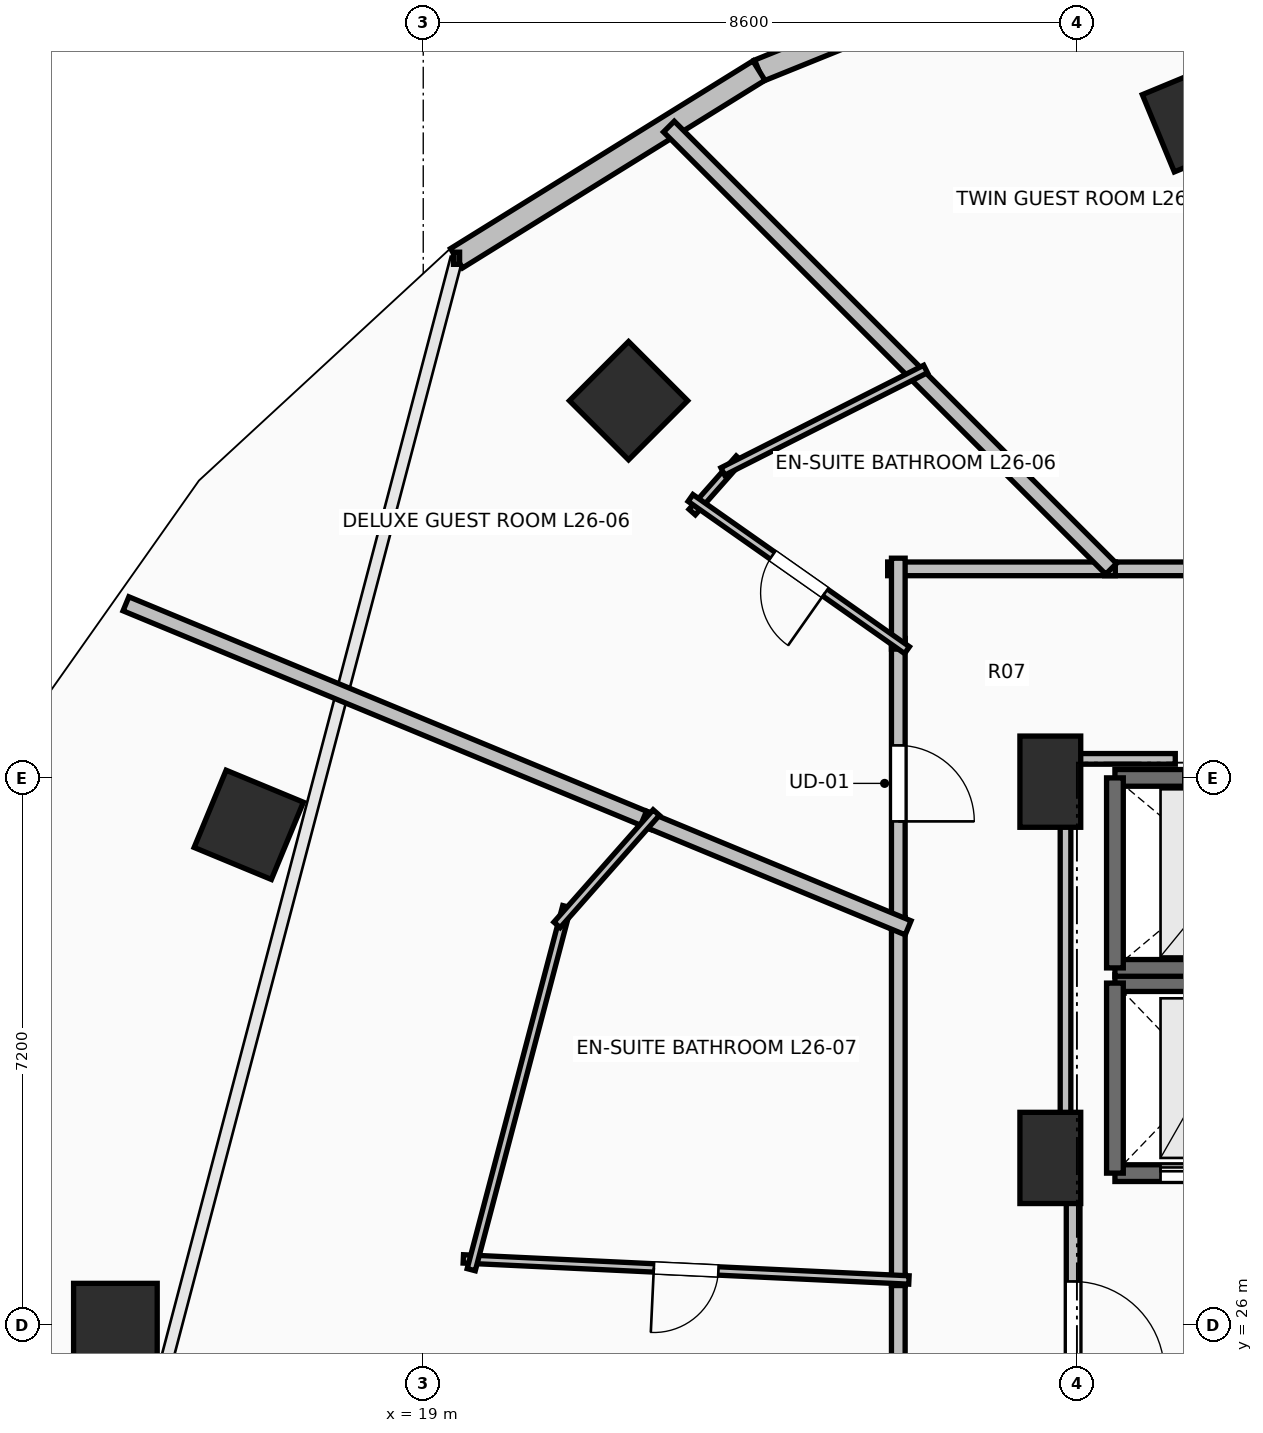
"""IFC4 building model, lengths in metres.
Left out: names, types, materials, properties, quantities, classifications, styles, units other than length and angle.
Written with IfcOpenShell. Run it as: python <this file> out.ifc"""

import sys

from ifc_helpers import new_model, si_unit, direction, frame, frame_2d, origin, origin_2d, place, context, subcontext, project, spatial, rectangle, extrude, element, fill, save


model = new_model("IFC4")
c1 = context("Model", 3, precision=1e-05, world=origin(), true_north=direction((0.0, 1.0)))
c2 = subcontext(c1, "Body", "Model", "MODEL_VIEW")
j1 = project(units=[si_unit("LENGTHUNIT", "METRE"), si_unit("PLANEANGLEUNIT", "RADIAN")], contexts=[c1])
p1 = place(None, origin())
s1 = spatial("IfcSite", under=j1, at=p1, CompositionType="ELEMENT")
p2 = place(p1, origin())
s2 = spatial("IfcBuilding", under=s1, at=p2, CompositionType="ELEMENT")
p3 = place(p2, frame((0.0, 0.0, 99.8)))
s3 = spatial("IfcBuildingStorey", under=s2, at=p3, CompositionType="ELEMENT", Elevation=99.8)
for number, where, z_axis, x_axis in (
    (1, (29.179, 41.891, 0.0), (0.0, 0.0, 1.0), (-0.383, 0.924, 0.0)),
    (2, (21.701, 38.162, 0.0), (0.0, 0.0, 1.0), (-0.707, 0.707, 0.0)),
    (3, (16.705, 32.582, 0.0), (0.0, 0.0, 1.0), (-0.924, 0.383, 0.0)),
    (4, (14.95, 26.0, 0.0), (0.0, 0.0, 1.0), (-1.0, 0.0, 0.0)),
):
    element("IfcColumn", number, at=place(p3, frame(where, z_axis=z_axis, x_axis=x_axis)), inside=s3, PredefinedType="COLUMN", context=c2, shape_type="SweptSolid", body=[
        extrude(rectangle(XDim=1.1, YDim=1.1, at=origin_2d()), origin(), (0.0, 0.0, 1.0), 3.5),
    ])
for number, where, z_axis, x_axis in (
    (5, (27.25, 28.2, 0.0), (0.0, 0.0, 1.0), (1.0, 0.0, 0.0)),
    (6, (27.25, 33.15, 0.0), (0.0, 0.0, 1.0), (1.0, 0.0, 0.0)),
):
    element("IfcColumn", number, at=place(p3, frame(where, z_axis=z_axis, x_axis=x_axis)), inside=s3, PredefinedType="PILASTER", context=c2, shape_type="SweptSolid", body=[
        extrude(rectangle(XDim=0.8, YDim=1.2, at=origin_2d()), origin(), (0.0, 0.0, 1.0), 3.5),
    ])
p4 = place(p3, frame((27.955, 44.339, 0.0), z_axis=(0.0, 0.0, 1.0), x_axis=(-0.927122233109, -0.374759075775, 0.0)))
e7 = element("IfcWall", 7, at=p4, inside=s3, PredefinedType="STANDARD", context=c2, shape_type="SweptSolid", body=[
    extrude(rectangle(XDim=4.895, YDim=0.3, at=frame_2d((2.448, 0.0))), origin(), (0.0, 0.0, 1.0), 3.24),
])
p5 = place(p4, frame((1.877, 0.0, 0.85)))
e8 = element("IfcOpeningElement", 8, at=p5, cuts=e7, PredefinedType="OPENING", context=c2, shape_type="SweptSolid", body=[
    extrude(rectangle(XDim=1.2, YDim=1.95, at=frame_2d((0.6, 0.975))), frame((0.0, 0.165, 0.0), z_axis=(0.0, -1.0, 0.0), x_axis=(1.0, 0.0, 0.0)), (0.0, 0.0, 1.0), 0.33),
])
p6 = place(p3, frame((23.416, 42.505, 0.0), z_axis=(0.0, 0.0, 1.0), x_axis=(-0.849684479743, -0.527291461038, 0.0)))
e9 = element("IfcWall", 9, at=p6, inside=s3, PredefinedType="STANDARD", context=c2, shape_type="SweptSolid", body=[
    extrude(rectangle(XDim=4.681, YDim=0.3, at=frame_2d((2.341, 0.0))), origin(), (0.0, 0.0, 1.0), 3.24),
])
p7 = place(p3, frame((28.1, 28.0, 0.0), z_axis=(0.0, 0.0, 1.0), x_axis=(1.0, 0.0, 0.0)))
e10 = element("IfcWall", 10, at=p7, inside=s3, PredefinedType="SHEAR", context=c2, shape_type="SweptSolid", body=[
    extrude(rectangle(XDim=2.4, YDim=0.22, at=frame_2d((1.2, 0.0))), origin(), (0.0, 0.0, 1.0), 3.24),
])
p8 = place(p7, frame((0.6, 0.0, 0.0)))
e11 = element("IfcOpeningElement", 11, at=p8, cuts=e10, PredefinedType="OPENING", context=c2, shape_type="SweptSolid", body=[
    extrude(rectangle(XDim=1.2, YDim=2.2, at=frame_2d((0.6, 1.1))), frame((0.0, 0.125, 0.0), z_axis=(0.0, -1.0, 0.0), x_axis=(1.0, 0.0, 0.0)), (0.0, 0.0, 1.0), 0.25),
])
p9 = place(p3, frame((30.5, 30.5, 0.0), z_axis=(0.0, 0.0, 1.0), x_axis=(-1.0, 0.0, 0.0)))
e12 = element("IfcWall", 12, at=p9, inside=s3, PredefinedType="SHEAR", context=c2, shape_type="SweptSolid", body=[
    extrude(rectangle(XDim=2.4, YDim=0.22, at=frame_2d((1.2, 0.0))), origin(), (0.0, 0.0, 1.0), 3.24),
])
p10 = place(p3, frame((28.1, 30.5, 0.0), z_axis=(0.0, 0.0, 1.0), x_axis=(0.0, -1.0, 0.0)))
e13 = element("IfcWall", 13, at=p10, inside=s3, PredefinedType="SHEAR", context=c2, shape_type="SweptSolid", body=[
    extrude(rectangle(XDim=2.5, YDim=0.22, at=frame_2d((1.25, 0.0))), origin(), (0.0, 0.0, 1.0), 3.24),
])
p11 = place(p3, frame((28.1, 30.7, 0.0), z_axis=(0.0, 0.0, 1.0), x_axis=(1.0, 0.0, 0.0)))
e14 = element("IfcWall", 14, at=p11, inside=s3, PredefinedType="SOLIDWALL", context=c2, shape_type="SweptSolid", body=[
    extrude(rectangle(XDim=3.0, YDim=0.22, at=frame_2d((1.5, 0.0))), origin(), (0.0, 0.0, 1.0), 3.24),
])
p12 = place(p3, frame((31.1, 33.2, 0.0), z_axis=(0.0, 0.0, 1.0), x_axis=(-1.0, 0.0, 0.0)))
e15 = element("IfcWall", 15, at=p12, inside=s3, PredefinedType="SOLIDWALL", context=c2, shape_type="SweptSolid", body=[
    extrude(rectangle(XDim=3.0, YDim=0.22, at=frame_2d((1.5, 0.0))), origin(), (0.0, 0.0, 1.0), 3.24),
])
p13 = place(p12, frame((0.9, 0.0, 0.0)))
e16 = element("IfcOpeningElement", 16, at=p13, cuts=e15, PredefinedType="OPENING", context=c2, shape_type="SweptSolid", body=[
    extrude(rectangle(XDim=1.2, YDim=2.2, at=frame_2d((0.6, 1.1))), frame((0.0, 0.125, 0.0), z_axis=(0.0, -1.0, 0.0), x_axis=(1.0, 0.0, 0.0)), (0.0, 0.0, 1.0), 0.25),
])
p14 = place(p3, frame((28.1, 33.2, 0.0), z_axis=(0.0, 0.0, 1.0), x_axis=(0.0, -1.0, 0.0)))
e17 = element("IfcWall", 17, at=p14, inside=s3, PredefinedType="SOLIDWALL", context=c2, shape_type="SweptSolid", body=[
    extrude(rectangle(XDim=2.5, YDim=0.22, at=frame_2d((1.25, 0.0))), origin(), (0.0, 0.0, 1.0), 3.24),
])
p15 = place(p3, frame((27.55, 28.0, 0.0), z_axis=(0.0, 0.0, 1.0), x_axis=(0.0, -1.0, 0.0)))
e18 = element("IfcWall", 18, at=p15, inside=s3, PredefinedType="PARTITIONING", context=c2, shape_type="SweptSolid", body=[
    extrude(rectangle(XDim=4.05, YDim=0.18, at=frame_2d((2.025, 0.0))), origin(), (0.0, 0.0, 1.0), 3.24),
])
p16 = place(p15, frame((1.425, 0.0, 0.0)))
e19 = element("IfcOpeningElement", 19, at=p16, cuts=e18, PredefinedType="OPENING", context=c2, shape_type="SweptSolid", body=[
    extrude(rectangle(XDim=1.2, YDim=2.15, at=frame_2d((0.6, 1.075))), frame((0.0, 0.105, 0.0), z_axis=(0.0, -1.0, 0.0), x_axis=(1.0, 0.0, 0.0)), (0.0, 0.0, 1.0), 0.21),
])
p17 = place(p3, frame((31.746, 35.95, 0.0), z_axis=(0.0, 0.0, 1.0), x_axis=(-1.0, 0.0, 0.0)))
e20 = element("IfcWall", 20, at=p17, inside=s3, PredefinedType="PARTITIONING", context=c2, shape_type="SweptSolid", body=[
    extrude(rectangle(XDim=3.781, YDim=0.18, at=frame_2d((1.891, 0.0))), origin(), (0.0, 0.0, 1.0), 2.432),
])
p18 = place(p17, frame((1.39, 0.0, 0.0)))
e21 = element("IfcOpeningElement", 21, at=p18, cuts=e20, PredefinedType="OPENING", context=c2, shape_type="SweptSolid", body=[
    extrude(rectangle(XDim=1.0, YDim=2.15, at=frame_2d((0.5, 1.075))), frame((0.0, 0.105, 0.0), z_axis=(0.0, -1.0, 0.0), x_axis=(1.0, 0.0, 0.0)), (0.0, 0.0, 1.0), 0.21),
])
p19 = place(p3, frame((25.25, 35.034, 0.0), z_axis=(0.0, 0.0, 1.0), x_axis=(0.0, -1.0, 0.0)))
e22 = element("IfcWall", 22, at=p19, inside=s3, PredefinedType="PARTITIONING", context=c2, shape_type="SweptSolid", body=[
    extrude(rectangle(XDim=3.813, YDim=0.18, at=frame_2d((1.906, 0.0))), origin(), (0.0, 0.0, 1.0), 2.432),
])
p20 = place(p19, frame((1.406, 0.0, 0.0)))
e23 = element("IfcOpeningElement", 23, at=p20, cuts=e22, PredefinedType="OPENING", context=c2, shape_type="SweptSolid", body=[
    extrude(rectangle(XDim=1.0, YDim=2.15, at=frame_2d((0.5, 1.075))), frame((0.0, 0.105, 0.0), z_axis=(0.0, -1.0, 0.0), x_axis=(1.0, 0.0, 0.0)), (0.0, 0.0, 1.0), 0.21),
])
p21 = place(p3, frame((28.105, 35.95, 0.0), z_axis=(0.0, 0.0, 1.0), x_axis=(-1.0, 0.0, 0.0)))
e24 = element("IfcWall", 24, at=p21, inside=s3, PredefinedType="PARTITIONING", context=c2, shape_type="SweptSolid", body=[
    extrude(rectangle(XDim=2.995, YDim=0.18, at=frame_2d((1.498, 0.0))), origin(), (0.0, 0.0, 1.0), 2.432),
])
p22 = place(p3, frame((25.25, 36.09, 0.0), z_axis=(0.0, 0.0, 1.0), x_axis=(0.0, -1.0, 0.0)))
e25 = element("IfcWall", 25, at=p22, inside=s3, PredefinedType="PARTITIONING", context=c2, shape_type="SweptSolid", body=[
    extrude(rectangle(XDim=1.196, YDim=0.18, at=frame_2d((0.598, 0.0))), origin(), (0.0, 0.0, 1.0), 2.432),
])
p23 = place(p3, frame((25.25, 26.661, 0.0), z_axis=(0.0, 0.0, 1.0), x_axis=(0.0, -1.0, 0.0)))
e26 = element("IfcWall", 26, at=p23, inside=s3, PredefinedType="PARTITIONING", context=c2, shape_type="SweptSolid", body=[
    extrude(rectangle(XDim=6.007, YDim=0.18, at=frame_2d((3.003, 0.0))), origin(), (0.0, 0.0, 1.0), 3.24),
])
p24 = place(p23, frame((2.479, 0.0, 0.0)))
e27 = element("IfcOpeningElement", 27, at=p24, cuts=e26, PredefinedType="OPENING", context=c2, shape_type="SweptSolid", body=[
    extrude(rectangle(XDim=1.05, YDim=2.2, at=frame_2d((0.525, 1.1))), frame((0.0, 0.105, 0.0), z_axis=(0.0, -1.0, 0.0), x_axis=(1.0, 0.0, 0.0)), (0.0, 0.0, 1.0), 0.21),
])
p25 = place(p3, frame((25.25, 31.361, 0.0), z_axis=(0.0, 0.0, 1.0), x_axis=(0.0, -1.0, 0.0)))
e28 = element("IfcWall", 28, at=p25, inside=s3, PredefinedType="PARTITIONING", context=c2, shape_type="SweptSolid", body=[
    extrude(rectangle(XDim=4.84, YDim=0.18, at=frame_2d((2.42, 0.0))), origin(), (0.0, 0.0, 1.0), 2.432),
])
p26 = place(p3, frame((22.232, 41.768, 0.0), z_axis=(0.0, 0.0, 1.0), x_axis=(0.707106781187, -0.707106781187, 0.0)))
e29 = element("IfcWall", 29, at=p26, inside=s3, PredefinedType="PARTITIONING", context=c2, shape_type="SweptSolid", body=[
    extrude(rectangle(XDim=8.228, YDim=0.2, at=frame_2d((4.114, 0.0))), origin(), (0.0, 0.0, 1.0), 2.432),
])
p27 = place(p3, frame((22.538, 36.697, 0.0), z_axis=(0.0, 0.0, 1.0), x_axis=(0.662242037053, 0.749289986827, 0.0)))
e30 = element("IfcWall", 30, at=p27, inside=s3, PredefinedType="PARTITIONING", context=c2, shape_type="SweptSolid", body=[
    extrude(rectangle(XDim=0.937, YDim=0.11, at=frame_2d((0.468, 0.0))), origin(), (0.0, 0.0, 1.0), 2.432),
])
p28 = place(p3, frame((22.941, 37.231, 0.0), z_axis=(0.0, 0.0, 1.0), x_axis=(0.892507731149, 0.451032094024, 0.0)))
e31 = element("IfcWall", 31, at=p28, inside=s3, PredefinedType="PARTITIONING", context=c2, shape_type="SweptSolid", body=[
    extrude(rectangle(XDim=2.989, YDim=0.11, at=frame_2d((1.495, 0.0))), origin(), (0.0, 0.0, 1.0), 2.432),
])
p29 = place(p3, frame((25.365, 34.881, 0.0), z_axis=(0.0, 0.0, 1.0), x_axis=(-0.81809360258, 0.575085087111, 0.0)))
e32 = element("IfcWall", 32, at=p29, inside=s3, PredefinedType="PARTITIONING", context=c2, shape_type="SweptSolid", body=[
    extrude(rectangle(XDim=3.481, YDim=0.11, at=frame_2d((1.741, 0.0))), origin(), (0.0, 0.0, 1.0), 2.432),
])
p30 = place(p29, frame((1.316, 0.0, 0.0)))
e33 = element("IfcOpeningElement", 33, at=p30, cuts=e32, PredefinedType="OPENING", context=c2, shape_type="SweptSolid", body=[
    extrude(rectangle(XDim=0.85, YDim=2.1, at=frame_2d((0.425, 1.05))), frame((0.0, 0.07, 0.0), z_axis=(0.0, -1.0, 0.0), x_axis=(1.0, 0.0, 0.0)), (0.0, 0.0, 1.0), 0.14),
])
p31 = place(p3, frame((15.089, 35.49, 0.0), z_axis=(0.0, 0.0, 1.0), x_axis=(0.923888472039, -0.382661849723, 0.0)))
e34 = element("IfcWall", 34, at=p31, inside=s3, PredefinedType="PARTITIONING", context=c2, shape_type="SweptSolid", body=[
    extrude(rectangle(XDim=7.51, YDim=0.2, at=frame_2d((3.755, 0.0))), origin(), (0.0, 0.0, 1.0), 2.677),
])
p32 = place(p3, frame((21.899, 32.669, 0.0), z_axis=(0.0, 0.0, 1.0), x_axis=(0.923843852071, -0.382769561211, 0.0)))
e35 = element("IfcWall", 35, at=p32, inside=s3, PredefinedType="PARTITIONING", context=c2, shape_type="SweptSolid", body=[
    extrude(rectangle(XDim=3.768, YDim=0.2, at=frame_2d((1.884, 0.0))), origin(), (0.0, 0.0, 1.0), 2.886),
])
p33 = place(p3, frame((25.39, 26.594, 0.0), z_axis=(0.0, 0.0, 1.0), x_axis=(-0.998884920498, 0.047211392719, 0.0)))
e36 = element("IfcWall", 36, at=p33, inside=s3, PredefinedType="PARTITIONING", context=c2, shape_type="SweptSolid", body=[
    extrude(rectangle(XDim=5.869, YDim=0.11, at=frame_2d((2.935, 0.0))), origin(), (0.0, 0.0, 1.0), 2.432),
])
p34 = place(p33, frame((2.51, 0.0, 0.0)))
e37 = element("IfcOpeningElement", 37, at=p34, cuts=e36, PredefinedType="OPENING", context=c2, shape_type="SweptSolid", body=[
    extrude(rectangle(XDim=0.85, YDim=2.1, at=frame_2d((0.425, 1.05))), frame((0.0, 0.07, 0.0), z_axis=(0.0, -1.0, 0.0), x_axis=(1.0, 0.0, 0.0)), (0.0, 0.0, 1.0), 0.14),
])
p35 = place(p3, frame((19.631, 26.729, 0.0), z_axis=(0.0, 0.0, 1.0), x_axis=(0.254541956306, 0.967061731473, 0.0)))
e38 = element("IfcWall", 38, at=p35, inside=s3, PredefinedType="PARTITIONING", context=c2, shape_type="SweptSolid", body=[
    extrude(rectangle(XDim=4.939, YDim=0.11, at=frame_2d((2.47, 0.0))), origin(), (0.0, 0.0, 1.0), 2.432),
])
p36 = place(p3, frame((20.76, 31.266, 0.0), z_axis=(0.0, 0.0, 1.0), x_axis=(0.662047420969, 0.749461948593, 0.0)))
e39 = element("IfcWall", 39, at=p36, inside=s3, PredefinedType="PARTITIONING", context=c2, shape_type="SweptSolid", body=[
    extrude(rectangle(XDim=1.972, YDim=0.11, at=frame_2d((0.986, 0.0))), origin(), (0.0, 0.0, 1.0), 3.24),
])
p37 = place(p3, frame((13.04, 26.0, 0.0), z_axis=(0.0, 0.0, 1.0), x_axis=(0.254345287821, -0.967113475536, 0.0)))
e40 = element("IfcWall", 40, at=p37, inside=s3, PredefinedType="PARTITIONING", context=c2, shape_type="SweptSolid", body=[
    extrude(rectangle(XDim=7.47, YDim=0.14, at=frame_2d((3.735, 0.0))), origin(), (0.0, 0.0, 1.0), 3.24),
])
p38 = place(p37, frame((3.285, 0.0, 0.0)))
e41 = element("IfcOpeningElement", 41, at=p38, cuts=e40, PredefinedType="OPENING", context=c2, shape_type="SweptSolid", body=[
    extrude(rectangle(XDim=0.9, YDim=2.1, at=frame_2d((0.45, 1.05))), frame((0.0, 0.085, 0.0), z_axis=(0.0, -1.0, 0.0), x_axis=(1.0, 0.0, 0.0)), (0.0, 0.0, 1.0), 0.17),
])
p39 = place(p3, frame((27.45, 28.196, 0.0), z_axis=(0.0, 0.0, 1.0), x_axis=(0.0, 1.0, 0.0)))
e42 = element("IfcWall", 42, at=p39, inside=s3, PredefinedType="PARTITIONING", context=c2, shape_type="SweptSolid", body=[
    extrude(rectangle(XDim=5.254, YDim=0.14, at=frame_2d((2.627, 0.0))), origin(), (0.0, 0.0, 1.0), 2.432),
])
p40 = place(p3, frame((27.45, 33.45, 0.0), z_axis=(0.0, 0.0, 1.0), x_axis=(1.0, 0.0, 0.0)))
e43 = element("IfcWall", 43, at=p40, inside=s3, PredefinedType="PARTITIONING", context=c2, shape_type="SweptSolid", body=[
    extrude(rectangle(XDim=1.444, YDim=0.14, at=frame_2d((0.722, 0.0))), origin(), (0.0, 0.0, 1.0), 2.432),
])
p41 = place(p8, origin())
e44 = element("IfcDoor", 44, at=p41, inside=s3, OperationType="SLIDING_TO_LEFT", PredefinedType="DOOR", context=c2, shape_type="SweptSolid", body=[
    extrude(rectangle(XDim=1.2, YDim=2.2, at=frame_2d((0.6, 1.1))), frame((0.0, 0.025, 0.0), z_axis=(0.0, -1.0, 0.0), x_axis=(1.0, 0.0, 0.0)), (0.0, 0.0, 1.0), 0.05),
])
fill(e11, e44)
p42 = place(p13, origin())
e45 = element("IfcDoor", 45, at=p42, inside=s3, OperationType="SLIDING_TO_LEFT", PredefinedType="DOOR", context=c2, shape_type="SweptSolid", body=[
    extrude(rectangle(XDim=1.2, YDim=2.2, at=frame_2d((0.6, 1.1))), frame((0.0, 0.025, 0.0), z_axis=(0.0, -1.0, 0.0), x_axis=(1.0, 0.0, 0.0)), (0.0, 0.0, 1.0), 0.05),
])
fill(e16, e45)
p43 = place(p16, origin())
e46 = element("IfcDoor", 46, at=p43, inside=s3, OperationType="SINGLE_SWING_RIGHT", PredefinedType="DOOR", context=c2, shape_type="SweptSolid", body=[
    extrude(rectangle(XDim=1.2, YDim=2.15, at=frame_2d((0.6, 1.075))), frame((0.0, 0.025, 0.0), z_axis=(0.0, -1.0, 0.0), x_axis=(1.0, 0.0, 0.0)), (0.0, 0.0, 1.0), 0.05),
])
fill(e19, e46)
p44 = place(p20, origin())
e47 = element("IfcDoor", 47, at=p44, inside=s3, OperationType="SINGLE_SWING_RIGHT", PredefinedType="DOOR", context=c2, shape_type="SweptSolid", body=[
    extrude(rectangle(XDim=1.0, YDim=2.15, at=frame_2d((0.5, 1.075))), frame((0.0, 0.025, 0.0), z_axis=(0.0, -1.0, 0.0), x_axis=(1.0, 0.0, 0.0)), (0.0, 0.0, 1.0), 0.05),
])
fill(e23, e47)
p45 = place(p30, origin())
e48 = element("IfcDoor", 48, at=p45, inside=s3, OperationType="SINGLE_SWING_LEFT", PredefinedType="DOOR", context=c2, shape_type="SweptSolid", body=[
    extrude(rectangle(XDim=0.85, YDim=2.1, at=frame_2d((0.425, 1.05))), frame((0.0, 0.025, 0.0), z_axis=(0.0, -1.0, 0.0), x_axis=(1.0, 0.0, 0.0)), (0.0, 0.0, 1.0), 0.05),
])
fill(e33, e48)
p46 = place(p34, origin())
e49 = element("IfcDoor", 49, at=p46, inside=s3, OperationType="SINGLE_SWING_RIGHT", PredefinedType="DOOR", context=c2, shape_type="SweptSolid", body=[
    extrude(rectangle(XDim=0.85, YDim=2.1, at=frame_2d((0.425, 1.05))), frame((0.0, 0.025, 0.0), z_axis=(0.0, -1.0, 0.0), x_axis=(1.0, 0.0, 0.0)), (0.0, 0.0, 1.0), 0.05),
])
fill(e37, e49)
save(model, sys.argv[1])
